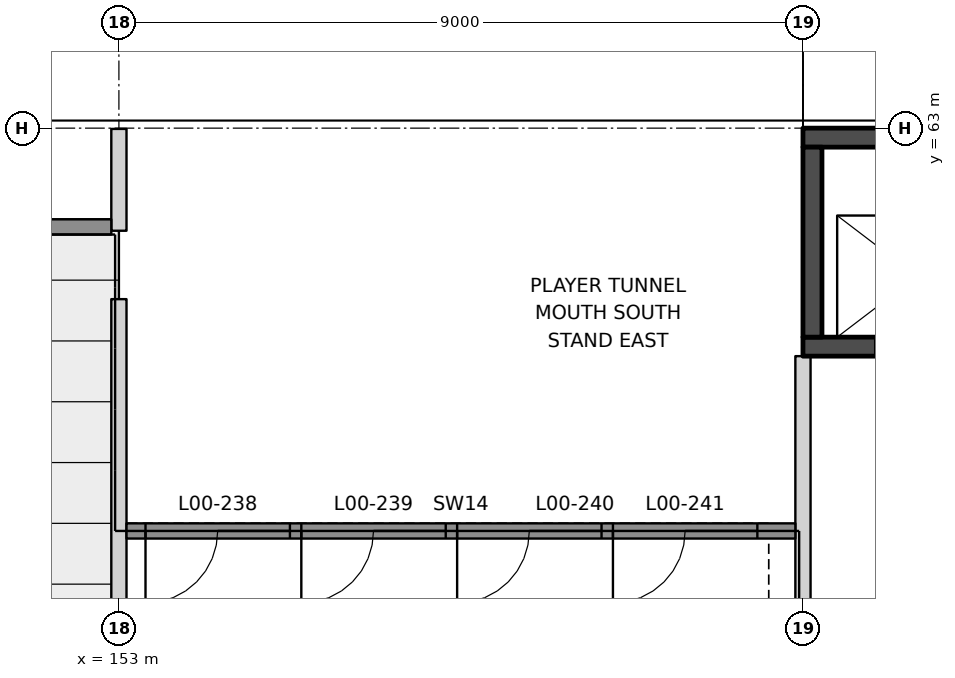
"""IFC4 building model, lengths in metres.
Left out: names, types, materials, properties, quantities, classifications, styles, units other than length and angle.
Written with IfcOpenShell. Run it as: python <this file> out.ifc"""

import sys

from ifc_helpers import new_model, si_unit, direction, frame, frame_2d, origin, place, context, subcontext, project, spatial, polyline, rectangle, outline, extrude, element, fill, save


model = new_model("IFC4")
c1 = context("Model", 3, precision=1e-05, world=origin(), true_north=direction((0.0, 1.0)))
c2 = subcontext(c1, "Body", "Model", "MODEL_VIEW")
j1 = project(units=[si_unit("LENGTHUNIT", "METRE"), si_unit("PLANEANGLEUNIT", "RADIAN")], contexts=[c1])
p1 = place(None, origin())
s1 = spatial("IfcSite", under=j1, at=p1, CompositionType="ELEMENT")
p2 = place(p1, origin())
s2 = spatial("IfcBuilding", under=s1, at=p2, CompositionType="ELEMENT")
p3 = place(p2, origin())
s3 = spatial("IfcBuildingStorey", under=s2, at=p3, CompositionType="ELEMENT", Elevation=0.0)
p4 = place(p3, frame((153.0, 54.45, 0.0), z_axis=(0.0, 0.0, 1.0), x_axis=(0.0, 1.0, 0.0)))
e1 = element("IfcWall", 1, at=p4, inside=s3, PredefinedType="PARTITIONING", context=c2, shape_type="SweptSolid", body=[
    extrude(outline(polyline([(0.0, 0.0), (6.3, 0.0), (6.3, 0.239), (5.815, 0.469), (4.362, 1.159), (0.0, 3.231), (0.0, 0.0)])), frame((0.0, 0.1, 0.0), z_axis=(0.0, -1.0, 0.0), x_axis=(1.0, 0.0, 0.0)), (0.0, 0.0, 1.0), 0.2),
])
p5 = place(p3, frame((153.0, 61.65, 0.0), z_axis=(0.0, 0.0, 1.0), x_axis=(0.0, 1.0, 0.0)))
e2 = element("IfcWall", 2, at=p5, inside=s3, PredefinedType="PARTITIONING", context=c2, shape_type="SweptSolid", body=[
    extrude(outline(polyline([(0.0, 0.0), (1.34, 0.0), (1.34, 7.0), (0.447, 7.0), (0.0, -0.189), (0.0, 0.0)])), frame((0.0, 0.1, 0.0), z_axis=(0.0, -1.0, 0.0), x_axis=(1.0, 0.0, 0.0)), (0.0, 0.0, 1.0), 0.2),
])
p6 = place(p3, frame((162.0, 54.45, 0.0), z_axis=(0.0, 0.0, 1.0), x_axis=(0.0, 1.0, 0.0)))
e3 = element("IfcWall", 3, at=p6, inside=s3, PredefinedType="PARTITIONING", context=c2, shape_type="SweptSolid", body=[
    extrude(rectangle(XDim=5.55, YDim=0.2, at=frame_2d((2.775, 0.0))), origin(), (0.0, 0.0, 1.0), 5.95),
])
p7 = place(p3, frame((162.0, 60.125, 0.0), z_axis=(0.0, 0.0, 1.0), x_axis=(1.0, 0.0, 0.0)))
e4 = element("IfcWall", 4, at=p7, inside=s3, PredefinedType="SHEAR", context=c2, shape_type="SweptSolid", body=[
    extrude(rectangle(XDim=9.0, YDim=0.25, at=frame_2d((4.5, 0.0))), origin(), (0.0, 0.0, 1.0), 7.0),
])
p8 = place(p7, frame((0.95, 0.0, 0.0)))
e5 = element("IfcOpeningElement", 5, at=p8, cuts=e4, PredefinedType="OPENING", context=c2, shape_type="SweptSolid", body=[
    extrude(rectangle(XDim=1.1, YDim=2.1, at=frame_2d((0.55, 1.05))), frame((0.0, 0.135, 0.0), z_axis=(0.0, -1.0, 0.0), x_axis=(1.0, 0.0, 0.0)), (0.0, 0.0, 1.0), 0.27),
])
p9 = place(p7, frame((3.95, 0.0, 0.0)))
e6 = element("IfcOpeningElement", 6, at=p9, cuts=e4, PredefinedType="OPENING", context=c2, shape_type="SweptSolid", body=[
    extrude(rectangle(XDim=1.1, YDim=2.1, at=frame_2d((0.55, 1.05))), frame((0.0, 0.135, 0.0), z_axis=(0.0, -1.0, 0.0), x_axis=(1.0, 0.0, 0.0)), (0.0, 0.0, 1.0), 0.27),
])
p10 = place(p7, frame((6.95, 0.0, 0.0)))
e7 = element("IfcOpeningElement", 7, at=p10, cuts=e4, PredefinedType="OPENING", context=c2, shape_type="SweptSolid", body=[
    extrude(rectangle(XDim=1.1, YDim=2.1, at=frame_2d((0.55, 1.05))), frame((0.0, 0.135, 0.0), z_axis=(0.0, -1.0, 0.0), x_axis=(1.0, 0.0, 0.0)), (0.0, 0.0, 1.0), 0.27),
])
p11 = place(p3, frame((162.0, 62.875, 0.0), z_axis=(0.0, 0.0, 1.0), x_axis=(1.0, 0.0, 0.0)))
e8 = element("IfcWall", 8, at=p11, inside=s3, PredefinedType="SHEAR", context=c2, shape_type="SweptSolid", body=[
    extrude(rectangle(XDim=9.0, YDim=0.25, at=frame_2d((4.5, 0.0))), origin(), (0.0, 0.0, 1.0), 7.0),
])
p12 = place(p3, frame((162.125, 60.25, 0.0), z_axis=(0.0, 0.0, 1.0), x_axis=(0.0, 1.0, 0.0)))
e9 = element("IfcWall", 9, at=p12, inside=s3, PredefinedType="SHEAR", context=c2, shape_type="SweptSolid", body=[
    extrude(rectangle(XDim=2.5, YDim=0.25, at=frame_2d((1.25, 0.0))), origin(), (0.0, 0.0, 1.0), 7.0),
])
p13 = place(p3, frame((153.1, 57.7, 0.0), z_axis=(0.0, 0.0, 1.0), x_axis=(1.0, 0.0, 0.0)))
e10 = element("IfcWall", 10, at=p13, inside=s3, PredefinedType="SOLIDWALL", context=c2, shape_type="SweptSolid", body=[
    extrude(rectangle(XDim=8.8, YDim=0.2, at=frame_2d((4.4, 0.0))), origin(), (0.0, 0.0, 1.0), 2.64),
])
p14 = place(p13, frame((0.25, 0.0, 0.0)))
e11 = element("IfcOpeningElement", 11, at=p14, cuts=e10, PredefinedType="OPENING", context=c2, shape_type="SweptSolid", body=[
    extrude(rectangle(XDim=1.9, YDim=2.1, at=frame_2d((0.95, 1.05))), frame((0.0, 0.11, 0.0), z_axis=(0.0, -1.0, 0.0), x_axis=(1.0, 0.0, 0.0)), (0.0, 0.0, 1.0), 0.22),
])
p15 = place(p13, frame((2.3, 0.0, 0.0)))
e12 = element("IfcOpeningElement", 12, at=p15, cuts=e10, PredefinedType="OPENING", context=c2, shape_type="SweptSolid", body=[
    extrude(rectangle(XDim=1.9, YDim=2.1, at=frame_2d((0.95, 1.05))), frame((0.0, 0.11, 0.0), z_axis=(0.0, -1.0, 0.0), x_axis=(1.0, 0.0, 0.0)), (0.0, 0.0, 1.0), 0.22),
])
p16 = place(p13, frame((4.35, 0.0, 0.0)))
e13 = element("IfcOpeningElement", 13, at=p16, cuts=e10, PredefinedType="OPENING", context=c2, shape_type="SweptSolid", body=[
    extrude(rectangle(XDim=1.9, YDim=2.1, at=frame_2d((0.95, 1.05))), frame((0.0, 0.11, 0.0), z_axis=(0.0, -1.0, 0.0), x_axis=(1.0, 0.0, 0.0)), (0.0, 0.0, 1.0), 0.22),
])
p17 = place(p13, frame((6.4, 0.0, 0.0)))
e14 = element("IfcOpeningElement", 14, at=p17, cuts=e10, PredefinedType="OPENING", context=c2, shape_type="SweptSolid", body=[
    extrude(rectangle(XDim=1.9, YDim=2.1, at=frame_2d((0.95, 1.05))), frame((0.0, 0.11, 0.0), z_axis=(0.0, -1.0, 0.0), x_axis=(1.0, 0.0, 0.0)), (0.0, 0.0, 1.0), 0.22),
])
p18 = place(p3, frame((145.5, 61.7, 0.0), z_axis=(0.0, 0.0, 1.0), x_axis=(1.0, 0.0, 0.0)))
e15 = element("IfcWall", 15, at=p18, inside=s3, PredefinedType="SOLIDWALL", context=c2, shape_type="SweptSolid", body=[
    extrude(rectangle(XDim=7.4, YDim=0.2, at=frame_2d((3.7, 0.0))), origin(), (0.0, 0.0, 1.0), 0.74),
])
p19 = place(p14, frame((1.9, 0.0, 0.0), z_axis=(0.0, 0.0, 1.0), x_axis=(-1.0, 0.0, 0.0)))
e16 = element("IfcDoor", 16, at=p19, inside=s3, OperationType="DOUBLE_DOOR_SINGLE_SWING", PredefinedType="DOOR", context=c2, shape_type="SweptSolid", body=[
    extrude(rectangle(XDim=1.9, YDim=2.1, at=frame_2d((0.95, 1.05))), frame((0.0, 0.025, 0.0), z_axis=(0.0, -1.0, 0.0), x_axis=(1.0, 0.0, 0.0)), (0.0, 0.0, 1.0), 0.05),
])
fill(e11, e16)
p20 = place(p15, frame((1.9, 0.0, 0.0), z_axis=(0.0, 0.0, 1.0), x_axis=(-1.0, 0.0, 0.0)))
e17 = element("IfcDoor", 17, at=p20, inside=s3, OperationType="DOUBLE_DOOR_SINGLE_SWING", PredefinedType="DOOR", context=c2, shape_type="SweptSolid", body=[
    extrude(rectangle(XDim=1.9, YDim=2.1, at=frame_2d((0.95, 1.05))), frame((0.0, 0.025, 0.0), z_axis=(0.0, -1.0, 0.0), x_axis=(1.0, 0.0, 0.0)), (0.0, 0.0, 1.0), 0.05),
])
fill(e12, e17)
p21 = place(p16, frame((1.9, 0.0, 0.0), z_axis=(0.0, 0.0, 1.0), x_axis=(-1.0, 0.0, 0.0)))
e18 = element("IfcDoor", 18, at=p21, inside=s3, OperationType="DOUBLE_DOOR_SINGLE_SWING", PredefinedType="DOOR", context=c2, shape_type="SweptSolid", body=[
    extrude(rectangle(XDim=1.9, YDim=2.1, at=frame_2d((0.95, 1.05))), frame((0.0, 0.025, 0.0), z_axis=(0.0, -1.0, 0.0), x_axis=(1.0, 0.0, 0.0)), (0.0, 0.0, 1.0), 0.05),
])
fill(e13, e18)
p22 = place(p17, frame((1.9, 0.0, 0.0), z_axis=(0.0, 0.0, 1.0), x_axis=(-1.0, 0.0, 0.0)))
e19 = element("IfcDoor", 19, at=p22, inside=s3, OperationType="DOUBLE_DOOR_SINGLE_SWING", PredefinedType="DOOR", context=c2, shape_type="SweptSolid", body=[
    extrude(rectangle(XDim=1.9, YDim=2.1, at=frame_2d((0.95, 1.05))), frame((0.0, 0.025, 0.0), z_axis=(0.0, -1.0, 0.0), x_axis=(1.0, 0.0, 0.0)), (0.0, 0.0, 1.0), 0.05),
])
fill(e14, e19)
save(model, sys.argv[1])
